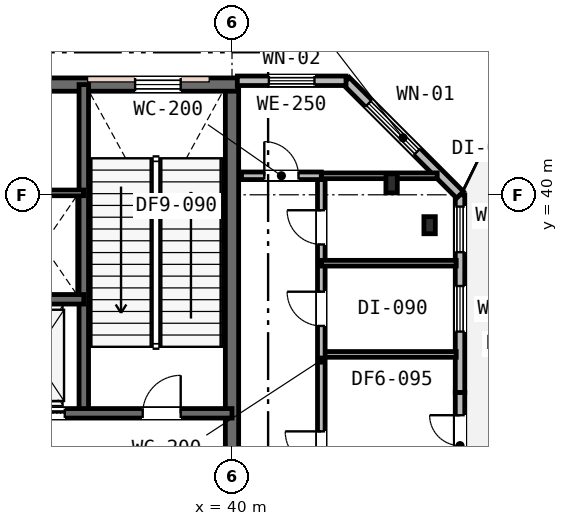
"""IFC4 building model, lengths in metres.
Left out: names, types, materials, properties, quantities, classifications, styles, units other than length and angle.
Written with IfcOpenShell. Run it as: python <this file> out.ifc"""

import sys

from ifc_helpers import new_model, si_unit, direction, frame, frame_2d, origin, origin_2d, place, context, subcontext, project, spatial, rectangle, i_section, extrude, element, fill, save


model = new_model("IFC4")
c1 = context("Model", 3, precision=1e-05, world=origin(), true_north=direction((0.0, 1.0)))
c2 = subcontext(c1, "Body", "Model", "MODEL_VIEW")
j1 = project(units=[si_unit("LENGTHUNIT", "METRE"), si_unit("PLANEANGLEUNIT", "RADIAN")], contexts=[c1])
p1 = place(None, origin())
s1 = spatial("IfcSite", under=j1, at=p1, CompositionType="ELEMENT")
p2 = place(p1, origin())
s2 = spatial("IfcBuilding", under=s1, at=p2, CompositionType="ELEMENT")
p3 = place(p2, frame((0.0, 0.0, 213.0)))
s3 = spatial("IfcBuildingStorey", under=s2, at=p3, CompositionType="ELEMENT", Elevation=213.0)
p4 = place(p3, frame((40.0, 30.65, 0.0), z_axis=(0.0, 0.0, 1.0), x_axis=(0.0, 1.0, 0.0)))
e1 = element("IfcWall", 1, at=p4, inside=s3, PredefinedType="SHEAR", context=c2, shape_type="SweptSolid", body=[
    extrude(rectangle(XDim=12.3, YDim=0.35, at=frame_2d((6.15, 0.0))), origin(), (0.0, 0.0, 1.0), 5.4),
])
p5 = place(p3, frame((15.85, 42.9, 0.0), z_axis=(0.0, 0.0, 1.0), x_axis=(1.0, 0.0, 0.0)))
e2 = element("IfcWall", 2, at=p5, inside=s3, PredefinedType="SHEAR", context=c2, shape_type="SweptSolid", body=[
    extrude(rectangle(XDim=24.3, YDim=0.35, at=frame_2d((12.15, 0.0))), origin(), (0.0, 0.0, 1.0), 5.4),
])
p6 = place(p5, frame((1.6, 0.0, 0.95)))
e3 = element("IfcOpeningElement", 3, at=p6, cuts=e2, PredefinedType="OPENING", context=c2, shape_type="SweptSolid", body=[
    extrude(rectangle(XDim=1.2, YDim=1.6, at=frame_2d((0.6, 0.8))), frame((0.0, 0.185, 0.0), z_axis=(0.0, -1.0, 0.0), x_axis=(1.0, 0.0, 0.0)), (0.0, 0.0, 1.0), 0.37),
])
p7 = place(p5, frame((16.5, 0.0, 0.95)))
e4 = element("IfcOpeningElement", 4, at=p7, cuts=e2, PredefinedType="OPENING", context=c2, shape_type="SweptSolid", body=[
    extrude(rectangle(XDim=1.2, YDim=1.6, at=frame_2d((0.6, 0.8))), frame((0.0, 0.185, 0.0), z_axis=(0.0, -1.0, 0.0), x_axis=(1.0, 0.0, 0.0)), (0.0, 0.0, 1.0), 0.37),
])
p8 = place(p5, frame((21.6, 0.0, 0.95)))
e5 = element("IfcOpeningElement", 5, at=p8, cuts=e2, PredefinedType="OPENING", context=c2, shape_type="SweptSolid", body=[
    extrude(rectangle(XDim=1.2, YDim=1.6, at=frame_2d((0.6, 0.8))), frame((0.0, 0.185, 0.0), z_axis=(0.0, -1.0, 0.0), x_axis=(1.0, 0.0, 0.0)), (0.0, 0.0, 1.0), 0.37),
])
p9 = place(p3, frame((36.1, 34.25, 0.0), z_axis=(0.0, 0.0, 1.0), x_axis=(0.0, 1.0, 0.0)))
e6 = element("IfcWall", 6, at=p9, inside=s3, PredefinedType="SHEAR", context=c2, shape_type="SweptSolid", body=[
    extrude(rectangle(XDim=8.65, YDim=0.25, at=frame_2d((4.325, 0.0))), origin(), (0.0, 0.0, 1.0), 5.4),
])
p10 = place(p3, frame((33.95, 34.25, 0.0), z_axis=(0.0, 0.0, 1.0), x_axis=(1.0, 0.0, 0.0)))
e7 = element("IfcWall", 7, at=p10, inside=s3, PredefinedType="SHEAR", context=c2, shape_type="SweptSolid", body=[
    extrude(rectangle(XDim=6.05, YDim=0.25, at=frame_2d((3.025, 0.0))), origin(), (0.0, 0.0, 1.0), 5.4),
])
p11 = place(p10, frame((3.7, 0.0, 0.0)))
e8 = element("IfcOpeningElement", 8, at=p11, cuts=e7, PredefinedType="OPENING", context=c2, shape_type="SweptSolid", body=[
    extrude(rectangle(XDim=1.0, YDim=2.15, at=frame_2d((0.5, 1.075))), frame((0.0, 0.135, 0.0), z_axis=(0.0, -1.0, 0.0), x_axis=(1.0, 0.0, 0.0)), (0.0, 0.0, 1.0), 0.27),
])
p12 = place(p10, frame((0.55, 0.0, 0.0)))
e9 = element("IfcOpeningElement", 9, at=p12, cuts=e7, PredefinedType="OPENING", context=c2, shape_type="SweptSolid", body=[
    extrude(rectangle(XDim=1.1, YDim=2.15, at=frame_2d((0.55, 1.075))), frame((0.0, 0.135, 0.0), z_axis=(0.0, -1.0, 0.0), x_axis=(1.0, 0.0, 0.0)), (0.0, 0.0, 1.0), 0.27),
])
p13 = place(p3, frame((19.9, 37.25, 0.0), z_axis=(0.0, 0.0, 1.0), x_axis=(1.0, 0.0, 0.0)))
e10 = element("IfcWall", 10, at=p13, inside=s3, PredefinedType="SHEAR", context=c2, shape_type="SweptSolid", body=[
    extrude(rectangle(XDim=16.2, YDim=0.25, at=frame_2d((8.1, 0.0))), origin(), (0.0, 0.0, 1.0), 5.4),
])
p14 = place(p13, frame((12.55, 0.0, 0.0)))
e11 = element("IfcOpeningElement", 11, at=p14, cuts=e10, PredefinedType="OPENING", context=c2, shape_type="SweptSolid", body=[
    extrude(rectangle(XDim=0.9, YDim=2.15, at=frame_2d((0.45, 1.075))), frame((0.0, 0.135, 0.0), z_axis=(0.0, -1.0, 0.0), x_axis=(1.0, 0.0, 0.0)), (0.0, 0.0, 1.0), 0.27),
])
p15 = place(p13, frame((2.5, 0.0, 0.0)))
e12 = element("IfcOpeningElement", 12, at=p15, cuts=e10, PredefinedType="OPENING", context=c2, shape_type="SweptSolid", body=[
    extrude(rectangle(XDim=1.05, YDim=2.15, at=frame_2d((0.525, 1.075))), frame((0.0, 0.135, 0.0), z_axis=(0.0, -1.0, 0.0), x_axis=(1.0, 0.0, 0.0)), (0.0, 0.0, 1.0), 0.27),
])
p16 = place(p13, frame((4.4, 0.0, 0.0)))
e13 = element("IfcOpeningElement", 13, at=p16, cuts=e10, PredefinedType="OPENING", context=c2, shape_type="SweptSolid", body=[
    extrude(rectangle(XDim=1.05, YDim=2.15, at=frame_2d((0.525, 1.075))), frame((0.0, 0.135, 0.0), z_axis=(0.0, -1.0, 0.0), x_axis=(1.0, 0.0, 0.0)), (0.0, 0.0, 1.0), 0.27),
])
p17 = place(p13, frame((6.3, 0.0, 0.0)))
e14 = element("IfcOpeningElement", 14, at=p17, cuts=e10, PredefinedType="OPENING", context=c2, shape_type="SweptSolid", body=[
    extrude(rectangle(XDim=1.05, YDim=2.15, at=frame_2d((0.525, 1.075))), frame((0.0, 0.135, 0.0), z_axis=(0.0, -1.0, 0.0), x_axis=(1.0, 0.0, 0.0)), (0.0, 0.0, 1.0), 0.27),
])
p18 = place(p3, frame((45.2, 39.2, 0.0), z_axis=(0.0, 0.0, 1.0), x_axis=(1.0, 0.0, 0.0)))
e15 = element("IfcColumn", 15, at=p18, inside=s3, PredefinedType="COLUMN", context=c2, shape_type="SweptSolid", body=[
    extrude(i_section(OverallWidth=0.3, OverallDepth=0.45, WebThickness=0.014, FlangeThickness=0.026, FilletRadius=0.027, at=origin_2d()), origin(), (0.0, 0.0, 1.0), 5.4),
])
p19 = place(p3, frame((44.2, 40.3, 0.0), z_axis=(0.0, 0.0, 1.0), x_axis=(1.0, 0.0, 0.0)))
e16 = element("IfcColumn", 16, at=p19, inside=s3, PredefinedType="COLUMN", context=c2, shape_type="SweptSolid", body=[
    extrude(i_section(OverallWidth=0.3, OverallDepth=0.5, WebThickness=0.015, FlangeThickness=0.028, FilletRadius=0.027, at=origin_2d()), origin(), (0.0, 0.0, 1.0), 5.4),
])
p20 = place(p3, frame((46.0, 32.0, 0.0), z_axis=(0.0, 0.0, 1.0), x_axis=(0.0, 1.0, 0.0)))
e17 = element("IfcWall", 17, at=p20, inside=s3, PredefinedType="STANDARD", context=c2, shape_type="SweptSolid", body=[
    extrude(rectangle(XDim=2.8, YDim=0.25, at=frame_2d((1.4, 0.0))), origin(), (0.0, 0.0, 1.0), 5.13),
])
p21 = place(p20, frame((0.6, 0.0, 0.0)))
e18 = element("IfcOpeningElement", 18, at=p21, cuts=e17, PredefinedType="OPENING", context=c2, shape_type="SweptSolid", body=[
    extrude(rectangle(XDim=1.6, YDim=2.2, at=frame_2d((0.8, 1.1))), frame((0.0, 0.135, 0.0), z_axis=(0.0, -1.0, 0.0), x_axis=(1.0, 0.0, 0.0)), (0.0, 0.0, 1.0), 0.27),
])
p22 = place(p3, frame((46.0, 34.8, 0.0), z_axis=(0.0, 0.0, 1.0), x_axis=(0.0, 1.0, 0.0)))
e19 = element("IfcWall", 19, at=p22, inside=s3, PredefinedType="STANDARD", context=c2, shape_type="SweptSolid", body=[
    extrude(rectangle(XDim=5.2, YDim=0.25, at=frame_2d((2.6, 0.0))), origin(), (0.0, 0.0, 1.0), 5.13),
])
p23 = place(p22, frame((1.6, 0.0, 0.85)))
e20 = element("IfcOpeningElement", 20, at=p23, cuts=e19, PredefinedType="OPENING", context=c2, shape_type="SweptSolid", body=[
    extrude(rectangle(XDim=1.2, YDim=1.6, at=frame_2d((0.6, 0.8))), frame((0.0, 0.135, 0.0), z_axis=(0.0, -1.0, 0.0), x_axis=(1.0, 0.0, 0.0)), (0.0, 0.0, 1.0), 0.27),
])
p24 = place(p22, frame((3.69, 0.0, 0.85)))
e21 = element("IfcOpeningElement", 21, at=p24, cuts=e19, PredefinedType="OPENING", context=c2, shape_type="SweptSolid", body=[
    extrude(rectangle(XDim=1.2, YDim=1.6, at=frame_2d((0.6, 0.8))), frame((0.0, 0.135, 0.0), z_axis=(0.0, -1.0, 0.0), x_axis=(1.0, 0.0, 0.0)), (0.0, 0.0, 1.0), 0.27),
])
p25 = place(p3, frame((46.0, 40.0, 0.0), z_axis=(0.0, 0.0, 1.0), x_axis=(-0.707106781187, 0.707106781187, 0.0)))
e22 = element("IfcWall", 22, at=p25, inside=s3, PredefinedType="STANDARD", context=c2, shape_type="SweptSolid", body=[
    extrude(rectangle(XDim=4.243, YDim=0.25, at=frame_2d((2.121, 0.0))), origin(), (0.0, 0.0, 1.0), 5.13),
])
p26 = place(p25, frame((1.6, 0.0, 0.75)))
e23 = element("IfcOpeningElement", 23, at=p26, cuts=e22, PredefinedType="OPENING", context=c2, shape_type="SweptSolid", body=[
    extrude(rectangle(XDim=1.8, YDim=1.85, at=frame_2d((0.9, 0.925))), frame((0.0, 0.135, 0.0), z_axis=(0.0, -1.0, 0.0), x_axis=(1.0, 0.0, 0.0)), (0.0, 0.0, 1.0), 0.27),
])
p27 = place(p3, frame((43.0, 43.0, 0.0), z_axis=(0.0, 0.0, 1.0), x_axis=(-1.0, 0.0, 0.0)))
e24 = element("IfcWall", 24, at=p27, inside=s3, PredefinedType="STANDARD", context=c2, shape_type="SweptSolid", body=[
    extrude(rectangle(XDim=2.86, YDim=0.25, at=frame_2d((1.43, 0.0))), origin(), (0.0, 0.0, 1.0), 5.13),
])
p28 = place(p27, frame((0.83, 0.0, 0.85)))
e25 = element("IfcOpeningElement", 25, at=p28, cuts=e24, PredefinedType="OPENING", context=c2, shape_type="SweptSolid", body=[
    extrude(rectangle(XDim=1.2, YDim=1.6, at=frame_2d((0.6, 0.8))), frame((0.0, 0.135, 0.0), z_axis=(0.0, -1.0, 0.0), x_axis=(1.0, 0.0, 0.0)), (0.0, 0.0, 1.0), 0.27),
])
p29 = place(p3, frame((34.05, 40.05, 0.0), z_axis=(0.0, 0.0, 1.0), x_axis=(1.0, 0.0, 0.0)))
e26 = element("IfcWall", 26, at=p29, inside=s3, PredefinedType="PARTITIONING", context=c2, shape_type="SweptSolid", body=[
    extrude(rectangle(XDim=2.05, YDim=0.15, at=frame_2d((1.025, 0.0))), origin(), (0.0, 0.0, 1.0), 5.13),
])
p30 = place(p3, frame((42.35, 35.8, 0.0), z_axis=(0.0, 0.0, 1.0), x_axis=(1.0, 0.0, 0.0)))
e27 = element("IfcWall", 27, at=p30, inside=s3, PredefinedType="PARTITIONING", context=c2, shape_type="SweptSolid", body=[
    extrude(rectangle(XDim=3.55, YDim=0.15, at=frame_2d((1.775, 0.0))), origin(), (0.0, 0.0, 1.0), 4.52),
])
p31 = place(p3, frame((42.35, 30.8, 0.0), z_axis=(0.0, 0.0, 1.0), x_axis=(0.0, 1.0, 0.0)))
e28 = element("IfcWall", 28, at=p31, inside=s3, PredefinedType="PARTITIONING", context=c2, shape_type="SweptSolid", body=[
    extrude(rectangle(XDim=9.7, YDim=0.2, at=frame_2d((4.85, 0.0))), origin(), (0.0, 0.0, 1.0), 4.52),
])
p32 = place(p31, frame((2.025, 0.0, 0.0)))
e29 = element("IfcOpeningElement", 29, at=p32, cuts=e28, PredefinedType="OPENING", context=c2, shape_type="SweptSolid", body=[
    extrude(rectangle(XDim=0.95, YDim=2.15, at=frame_2d((0.475, 1.075))), frame((0.0, 0.11, 0.0), z_axis=(0.0, -1.0, 0.0), x_axis=(1.0, 0.0, 0.0)), (0.0, 0.0, 1.0), 0.22),
])
p33 = place(p31, frame((5.75, 0.0, 0.0)))
e30 = element("IfcOpeningElement", 30, at=p33, cuts=e28, PredefinedType="OPENING", context=c2, shape_type="SweptSolid", body=[
    extrude(rectangle(XDim=0.9, YDim=2.15, at=frame_2d((0.45, 1.075))), frame((0.0, 0.11, 0.0), z_axis=(0.0, -1.0, 0.0), x_axis=(1.0, 0.0, 0.0)), (0.0, 0.0, 1.0), 0.22),
])
p34 = place(p31, frame((7.893, 0.0, 0.0)))
e31 = element("IfcOpeningElement", 31, at=p34, cuts=e28, PredefinedType="OPENING", context=c2, shape_type="SweptSolid", body=[
    extrude(rectangle(XDim=0.9, YDim=2.15, at=frame_2d((0.45, 1.075))), frame((0.0, 0.11, 0.0), z_axis=(0.0, -1.0, 0.0), x_axis=(1.0, 0.0, 0.0)), (0.0, 0.0, 1.0), 0.22),
])
p35 = place(p3, frame((42.35, 38.2, 0.0), z_axis=(0.0, 0.0, 1.0), x_axis=(1.0, 0.0, 0.0)))
e32 = element("IfcWall", 32, at=p35, inside=s3, PredefinedType="PARTITIONING", context=c2, shape_type="SweptSolid", body=[
    extrude(rectangle(XDim=3.55, YDim=0.15, at=frame_2d((1.775, 0.0))), origin(), (0.0, 0.0, 1.0), 4.52),
])
p36 = place(p3, frame((42.35, 40.5, 0.0), z_axis=(0.0, 0.0, 1.0), x_axis=(1.0, 0.0, 0.0)))
e33 = element("IfcWall", 33, at=p36, inside=s3, PredefinedType="PARTITIONING", context=c2, shape_type="SweptSolid", body=[
    extrude(rectangle(XDim=3.05, YDim=0.15, at=frame_2d((1.525, 0.0))), origin(), (0.0, 0.0, 1.0), 4.52),
])
p37 = place(p3, frame((40.25, 40.5, 0.0), z_axis=(0.0, 0.0, 1.0), x_axis=(1.0, 0.0, 0.0)))
e34 = element("IfcWall", 34, at=p37, inside=s3, PredefinedType="PARTITIONING", context=c2, shape_type="SweptSolid", body=[
    extrude(rectangle(XDim=2.1, YDim=0.2, at=frame_2d((1.05, 0.0))), origin(), (0.0, 0.0, 1.0), 5.13),
])
p38 = place(p37, frame((0.6, 0.0, 0.0)))
e35 = element("IfcOpeningElement", 35, at=p38, cuts=e34, PredefinedType="OPENING", context=c2, shape_type="SweptSolid", body=[
    extrude(rectangle(XDim=0.9, YDim=2.15, at=frame_2d((0.45, 1.075))), frame((0.0, 0.11, 0.0), z_axis=(0.0, -1.0, 0.0), x_axis=(1.0, 0.0, 0.0)), (0.0, 0.0, 1.0), 0.22),
])
p39 = place(p8, origin())
e36 = element("IfcWindow", 36, at=p39, inside=s3, PartitioningType="SINGLE_PANEL", PredefinedType="WINDOW", context=c2, shape_type="SweptSolid", body=[
    extrude(rectangle(XDim=1.2, YDim=1.6, at=frame_2d((0.6, 0.8))), frame((0.0, 0.03, 0.0), z_axis=(0.0, -1.0, 0.0), x_axis=(1.0, 0.0, 0.0)), (0.0, 0.0, 1.0), 0.06),
])
fill(e5, e36)
p40 = place(p21, origin())
e37 = element("IfcDoor", 37, at=p40, inside=s3, OperationType="DOUBLE_DOOR_SINGLE_SWING", PredefinedType="DOOR", context=c2, shape_type="SweptSolid", body=[
    extrude(rectangle(XDim=1.6, YDim=2.2, at=frame_2d((0.8, 1.1))), frame((0.0, 0.025, 0.0), z_axis=(0.0, -1.0, 0.0), x_axis=(1.0, 0.0, 0.0)), (0.0, 0.0, 1.0), 0.05),
])
fill(e18, e37)
p41 = place(p23, origin())
e38 = element("IfcWindow", 38, at=p41, inside=s3, PartitioningType="SINGLE_PANEL", PredefinedType="WINDOW", context=c2, shape_type="SweptSolid", body=[
    extrude(rectangle(XDim=1.2, YDim=1.6, at=frame_2d((0.6, 0.8))), frame((0.0, 0.03, 0.0), z_axis=(0.0, -1.0, 0.0), x_axis=(1.0, 0.0, 0.0)), (0.0, 0.0, 1.0), 0.06),
])
fill(e20, e38)
p42 = place(p24, origin())
e39 = element("IfcWindow", 39, at=p42, inside=s3, PartitioningType="SINGLE_PANEL", PredefinedType="WINDOW", context=c2, shape_type="SweptSolid", body=[
    extrude(rectangle(XDim=1.2, YDim=1.6, at=frame_2d((0.6, 0.8))), frame((0.0, 0.03, 0.0), z_axis=(0.0, -1.0, 0.0), x_axis=(1.0, 0.0, 0.0)), (0.0, 0.0, 1.0), 0.06),
])
fill(e21, e39)
p43 = place(p26, origin())
e40 = element("IfcWindow", 40, at=p43, inside=s3, PartitioningType="SINGLE_PANEL", PredefinedType="WINDOW", context=c2, shape_type="SweptSolid", body=[
    extrude(rectangle(XDim=1.8, YDim=1.85, at=frame_2d((0.9, 0.925))), frame((0.0, 0.03, 0.0), z_axis=(0.0, -1.0, 0.0), x_axis=(1.0, 0.0, 0.0)), (0.0, 0.0, 1.0), 0.06),
])
fill(e23, e40)
p44 = place(p28, origin())
e41 = element("IfcWindow", 41, at=p44, inside=s3, PartitioningType="SINGLE_PANEL", PredefinedType="WINDOW", context=c2, shape_type="SweptSolid", body=[
    extrude(rectangle(XDim=1.2, YDim=1.6, at=frame_2d((0.6, 0.8))), frame((0.0, 0.03, 0.0), z_axis=(0.0, -1.0, 0.0), x_axis=(1.0, 0.0, 0.0)), (0.0, 0.0, 1.0), 0.06),
])
fill(e25, e41)
p45 = place(p11, origin())
e42 = element("IfcDoor", 42, at=p45, inside=s3, OperationType="SINGLE_SWING_RIGHT", PredefinedType="DOOR", context=c2, shape_type="SweptSolid", body=[
    extrude(rectangle(XDim=1.0, YDim=2.15, at=frame_2d((0.5, 1.075))), frame((0.0, 0.025, 0.0), z_axis=(0.0, -1.0, 0.0), x_axis=(1.0, 0.0, 0.0)), (0.0, 0.0, 1.0), 0.05),
])
fill(e8, e42)
p46 = place(p32, origin())
e43 = element("IfcDoor", 43, at=p46, inside=s3, OperationType="SINGLE_SWING_RIGHT", PredefinedType="DOOR", context=c2, shape_type="SweptSolid", body=[
    extrude(rectangle(XDim=0.95, YDim=2.15, at=frame_2d((0.475, 1.075))), frame((0.0, 0.025, 0.0), z_axis=(0.0, -1.0, 0.0), x_axis=(1.0, 0.0, 0.0)), (0.0, 0.0, 1.0), 0.05),
])
fill(e29, e43)
p47 = place(p33, origin())
e44 = element("IfcDoor", 44, at=p47, inside=s3, OperationType="SINGLE_SWING_RIGHT", PredefinedType="DOOR", context=c2, shape_type="SweptSolid", body=[
    extrude(rectangle(XDim=0.9, YDim=2.15, at=frame_2d((0.45, 1.075))), frame((0.0, 0.025, 0.0), z_axis=(0.0, -1.0, 0.0), x_axis=(1.0, 0.0, 0.0)), (0.0, 0.0, 1.0), 0.05),
])
fill(e30, e44)
p48 = place(p34, origin())
e45 = element("IfcDoor", 45, at=p48, inside=s3, OperationType="SINGLE_SWING_RIGHT", PredefinedType="DOOR", context=c2, shape_type="SweptSolid", body=[
    extrude(rectangle(XDim=0.9, YDim=2.15, at=frame_2d((0.45, 1.075))), frame((0.0, 0.025, 0.0), z_axis=(0.0, -1.0, 0.0), x_axis=(1.0, 0.0, 0.0)), (0.0, 0.0, 1.0), 0.05),
])
fill(e31, e45)
p49 = place(p38, origin())
e46 = element("IfcDoor", 46, at=p49, inside=s3, OperationType="SINGLE_SWING_LEFT", PredefinedType="DOOR", context=c2, shape_type="SweptSolid", body=[
    extrude(rectangle(XDim=0.9, YDim=2.15, at=frame_2d((0.45, 1.075))), frame((0.0, 0.025, 0.0), z_axis=(0.0, -1.0, 0.0), x_axis=(1.0, 0.0, 0.0)), (0.0, 0.0, 1.0), 0.05),
])
fill(e35, e46)
p50 = place(p12, origin())
e47 = element("IfcDoor", 47, at=p50, inside=s3, OperationType="DOUBLE_DOOR_SLIDING", PredefinedType="DOOR", context=c2, shape_type="SweptSolid", body=[
    extrude(rectangle(XDim=1.1, YDim=2.15, at=frame_2d((0.55, 1.075))), frame((0.0, 0.025, 0.0), z_axis=(0.0, -1.0, 0.0), x_axis=(1.0, 0.0, 0.0)), (0.0, 0.0, 1.0), 0.05),
])
fill(e9, e47)
save(model, sys.argv[1])
